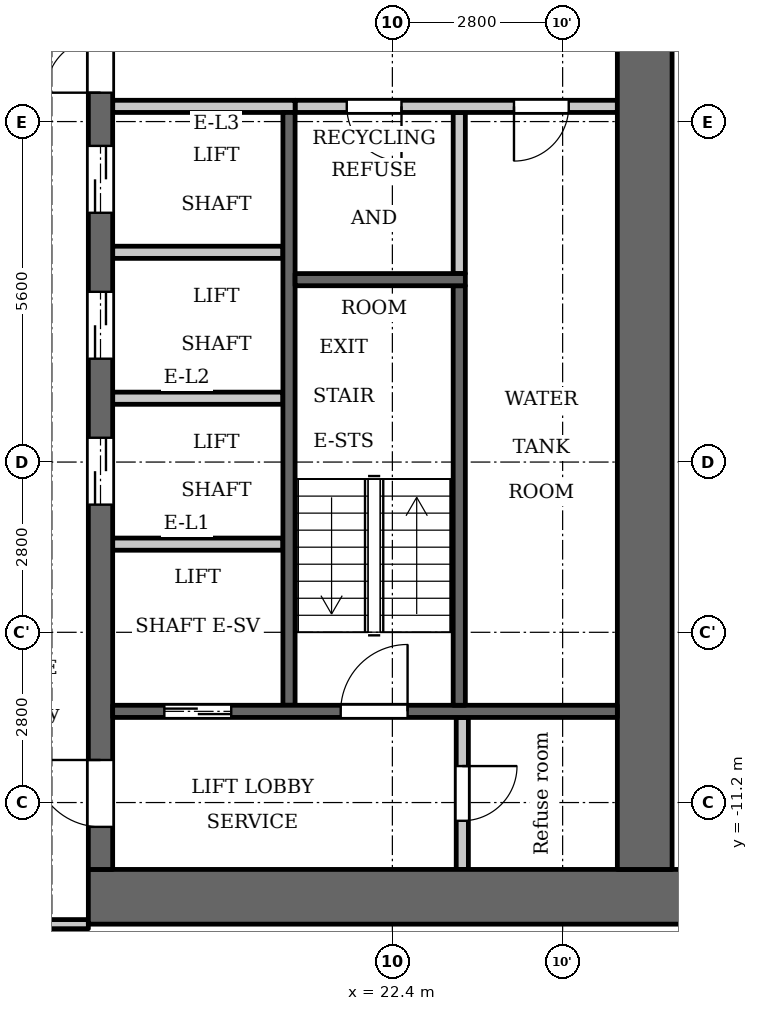
"""IFC4 building model, lengths in metres.
Left out: names, types, materials, properties, quantities, classifications, styles, units other than length and angle.
Written with IfcOpenShell. Run it as: python <this file> out.ifc"""

import sys

from ifc_helpers import new_model, si_unit, direction, frame, frame_2d, origin, place, context, subcontext, project, spatial, rectangle, extrude, element, fill, save


model = new_model("IFC4")
c1 = context("Model", 3, precision=1e-05, world=origin(), true_north=direction((0.0, 1.0)))
c2 = subcontext(c1, "Body", "Model", "MODEL_VIEW")
j1 = project(units=[si_unit("LENGTHUNIT", "METRE"), si_unit("PLANEANGLEUNIT", "RADIAN")], contexts=[c1])
p1 = place(None, origin())
s1 = spatial("IfcSite", under=j1, at=p1, CompositionType="ELEMENT")
p2 = place(p1, origin())
s2 = spatial("IfcBuilding", under=s1, at=p2, CompositionType="ELEMENT")
p3 = place(p2, frame((0.0, 0.0, 65.5)))
s3 = spatial("IfcBuildingStorey", under=s2, at=p3, CompositionType="ELEMENT", Elevation=65.5)
p4 = place(p3, frame((23.5, -2.5, 0.0), z_axis=(0.0, 0.0, 1.0), x_axis=(0.0, 1.0, 0.0)))
e1 = element("IfcWall", 1, at=p4, inside=s3, PredefinedType="PARTITIONING", context=c2, shape_type="SweptSolid", body=[
    extrude(rectangle(XDim=2.65, YDim=0.2, at=frame_2d((1.325, 0.0))), origin(), (0.0, 0.0, 1.0), 3.2),
])
p5 = place(p3, frame((20.7, -9.6, 0.0), z_axis=(0.0, 0.0, 1.0), x_axis=(0.0, 1.0, 0.0)))
e2 = element("IfcWall", 2, at=p5, inside=s3, PredefinedType="SHEAR", context=c2, shape_type="SweptSolid", body=[
    extrude(rectangle(XDim=9.75, YDim=0.2, at=frame_2d((4.875, 0.0))), origin(), (0.0, 0.0, 1.0), 3.2),
])
p6 = place(p3, frame((20.8, 0.25, 0.0), z_axis=(0.0, 0.0, 1.0), x_axis=(1.0, 0.0, 0.0)))
e3 = element("IfcWall", 3, at=p6, inside=s3, PredefinedType="PARTITIONING", context=c2, shape_type="SweptSolid", body=[
    extrude(rectangle(XDim=5.3, YDim=0.2, at=frame_2d((2.65, 0.0))), origin(), (0.0, 0.0, 1.0), 3.2),
])
p7 = place(p6, frame((0.85, 0.0, 0.0)))
e4 = element("IfcOpeningElement", 4, at=p7, cuts=e3, PredefinedType="OPENING", context=c2, shape_type="SweptSolid", body=[
    extrude(rectangle(XDim=0.9, YDim=2.1, at=frame_2d((0.45, 1.05))), frame((0.0, 0.11, 0.0), z_axis=(0.0, -1.0, 0.0), x_axis=(1.0, 0.0, 0.0)), (0.0, 0.0, 1.0), 0.22),
])
p8 = place(p6, frame((3.6, 0.0, 0.0)))
e5 = element("IfcOpeningElement", 5, at=p8, cuts=e3, PredefinedType="OPENING", context=c2, shape_type="SweptSolid", body=[
    extrude(rectangle(XDim=0.9, YDim=2.1, at=frame_2d((0.45, 1.05))), frame((0.0, 0.11, 0.0), z_axis=(0.0, -1.0, 0.0), x_axis=(1.0, 0.0, 0.0)), (0.0, 0.0, 1.0), 0.22),
])
p9 = place(p3, frame((17.4, -12.75, 0.0), z_axis=(0.0, 0.0, 1.0), x_axis=(1.0, 0.0, 0.0)))
e6 = element("IfcWall", 6, at=p9, inside=s3, PredefinedType="SHEAR", context=c2, shape_type="SweptSolid", body=[
    extrude(rectangle(XDim=10.4, YDim=0.9, at=frame_2d((5.2, 0.0))), origin(), (0.0, 0.0, 1.0), 3.2),
])
p10 = place(p3, frame((17.6, -12.3, 0.0), z_axis=(0.0, 0.0, 1.0), x_axis=(0.0, 1.0, 0.0)))
e7 = element("IfcWall", 7, at=p10, inside=s3, PredefinedType="SHEAR", context=c2, shape_type="SweptSolid", body=[
    extrude(rectangle(XDim=24.6, YDim=0.4, at=frame_2d((12.3, 0.0))), origin(), (0.0, 0.0, 1.0), 3.2),
])
p11 = place(p10, frame((6.0, 0.0, 0.0)))
e8 = element("IfcOpeningElement", 8, at=p11, cuts=e7, PredefinedType="OPENING", context=c2, shape_type="SweptSolid", body=[
    extrude(rectangle(XDim=1.1, YDim=2.1, at=frame_2d((0.55, 1.05))), frame((0.0, 0.21, 0.0), z_axis=(0.0, -1.0, 0.0), x_axis=(1.0, 0.0, 0.0)), (0.0, 0.0, 1.0), 0.42),
])
p12 = place(p10, frame((8.4, 0.0, 0.0)))
e9 = element("IfcOpeningElement", 9, at=p12, cuts=e7, PredefinedType="OPENING", context=c2, shape_type="SweptSolid", body=[
    extrude(rectangle(XDim=1.1, YDim=2.1, at=frame_2d((0.55, 1.05))), frame((0.0, 0.21, 0.0), z_axis=(0.0, -1.0, 0.0), x_axis=(1.0, 0.0, 0.0)), (0.0, 0.0, 1.0), 0.42),
])
p13 = place(p10, frame((10.8, 0.0, 0.0)))
e10 = element("IfcOpeningElement", 10, at=p13, cuts=e7, PredefinedType="OPENING", context=c2, shape_type="SweptSolid", body=[
    extrude(rectangle(XDim=1.1, YDim=2.1, at=frame_2d((0.55, 1.05))), frame((0.0, 0.21, 0.0), z_axis=(0.0, -1.0, 0.0), x_axis=(1.0, 0.0, 0.0)), (0.0, 0.0, 1.0), 0.42),
])
p14 = place(p10, frame((16.75, 0.0, 0.0)))
e11 = element("IfcOpeningElement", 11, at=p14, cuts=e7, PredefinedType="OPENING", context=c2, shape_type="SweptSolid", body=[
    extrude(rectangle(XDim=0.9, YDim=2.1, at=frame_2d((0.45, 1.05))), frame((0.0, 0.21, 0.0), z_axis=(0.0, -1.0, 0.0), x_axis=(1.0, 0.0, 0.0)), (0.0, 0.0, 1.0), 0.42),
])
p15 = place(p10, frame((22.8, 0.0, 0.0)))
e12 = element("IfcOpeningElement", 12, at=p15, cuts=e7, PredefinedType="OPENING", context=c2, shape_type="SweptSolid", body=[
    extrude(rectangle(XDim=1.1, YDim=2.1, at=frame_2d((0.55, 1.05))), frame((0.0, 0.21, 0.0), z_axis=(0.0, -1.0, 0.0), x_axis=(1.0, 0.0, 0.0)), (0.0, 0.0, 1.0), 0.42),
])
p16 = place(p10, frame((0.7, 0.0, 0.0)))
e13 = element("IfcOpeningElement", 13, at=p16, cuts=e7, PredefinedType="OPENING", context=c2, shape_type="SweptSolid", body=[
    extrude(rectangle(XDim=1.1, YDim=2.1, at=frame_2d((0.55, 1.05))), frame((0.0, 0.21, 0.0), z_axis=(0.0, -1.0, 0.0), x_axis=(1.0, 0.0, 0.0)), (0.0, 0.0, 1.0), 0.42),
])
p17 = place(p10, frame((12.775, 0.0, 0.0)))
e14 = element("IfcOpeningElement", 14, at=p17, cuts=e7, PredefinedType="OPENING", context=c2, shape_type="SweptSolid", body=[
    extrude(rectangle(XDim=1.8, YDim=2.1, at=frame_2d((0.9, 1.05))), frame((0.0, 0.21, 0.0), z_axis=(0.0, -1.0, 0.0), x_axis=(1.0, 0.0, 0.0)), (0.0, 0.0, 1.0), 0.42),
])
p18 = place(p3, frame((26.55, -12.3, 0.0), z_axis=(0.0, 0.0, 1.0), x_axis=(0.0, 1.0, 0.0)))
e15 = element("IfcWall", 15, at=p18, inside=s3, PredefinedType="SHEAR", context=c2, shape_type="SweptSolid", body=[
    extrude(rectangle(XDim=24.6, YDim=0.9, at=frame_2d((12.3, 0.0))), origin(), (0.0, 0.0, 1.0), 3.2),
])
p19 = place(p3, frame((23.55, -12.3, 0.0), z_axis=(0.0, 0.0, 1.0), x_axis=(0.0, 1.0, 0.0)))
e16 = element("IfcWall", 16, at=p19, inside=s3, PredefinedType="PARTITIONING", context=c2, shape_type="SweptSolid", body=[
    extrude(rectangle(XDim=2.5, YDim=0.2, at=frame_2d((1.25, 0.0))), origin(), (0.0, 0.0, 1.0), 3.2),
])
p20 = place(p19, frame((0.8, 0.0, 0.0)))
e17 = element("IfcOpeningElement", 17, at=p20, cuts=e16, PredefinedType="OPENING", context=c2, shape_type="SweptSolid", body=[
    extrude(rectangle(XDim=0.9, YDim=2.1, at=frame_2d((0.45, 1.05))), frame((0.0, 0.11, 0.0), z_axis=(0.0, -1.0, 0.0), x_axis=(1.0, 0.0, 0.0)), (0.0, 0.0, 1.0), 0.22),
])
p21 = place(p3, frame((17.8, -9.7, 0.0), z_axis=(0.0, 0.0, 1.0), x_axis=(1.0, 0.0, 0.0)))
e18 = element("IfcWall", 18, at=p21, inside=s3, PredefinedType="SHEAR", context=c2, shape_type="SweptSolid", body=[
    extrude(rectangle(XDim=8.3, YDim=0.2, at=frame_2d((4.15, 0.0))), origin(), (0.0, 0.0, 1.0), 3.2),
])
p22 = place(p21, frame((0.85, 0.0, 0.0)))
e19 = element("IfcOpeningElement", 19, at=p22, cuts=e18, PredefinedType="OPENING", context=c2, shape_type="SweptSolid", body=[
    extrude(rectangle(XDim=1.1, YDim=2.1, at=frame_2d((0.55, 1.05))), frame((0.0, 0.11, 0.0), z_axis=(0.0, -1.0, 0.0), x_axis=(1.0, 0.0, 0.0)), (0.0, 0.0, 1.0), 0.22),
])
p23 = place(p21, frame((3.75, 0.0, 0.0)))
e20 = element("IfcOpeningElement", 20, at=p23, cuts=e18, PredefinedType="OPENING", context=c2, shape_type="SweptSolid", body=[
    extrude(rectangle(XDim=1.1, YDim=2.1, at=frame_2d((0.55, 1.05))), frame((0.0, 0.11, 0.0), z_axis=(0.0, -1.0, 0.0), x_axis=(1.0, 0.0, 0.0)), (0.0, 0.0, 1.0), 0.22),
])
for number, where, z_axis, x_axis in (
    (21, (17.8, -6.95, 0.0), (0.0, 0.0, 1.0), (1.0, 0.0, 0.0)),
    (22, (17.8, -4.55, 0.0), (0.0, 0.0, 1.0), (1.0, 0.0, 0.0)),
    (23, (17.8, -2.15, 0.0), (0.0, 0.0, 1.0), (1.0, 0.0, 0.0)),
):
    element("IfcWall", number, at=place(p3, frame(where, z_axis=z_axis, x_axis=x_axis)), inside=s3, PredefinedType="PARTITIONING", context=c2, shape_type="SweptSolid", body=[
        extrude(rectangle(XDim=2.8, YDim=0.2, at=frame_2d((1.4, 0.0))), origin(), (0.0, 0.0, 1.0), 3.2),
    ])
p24 = place(p3, frame((17.8, 0.25, 0.0), z_axis=(0.0, 0.0, 1.0), x_axis=(1.0, 0.0, 0.0)))
e24 = element("IfcWall", 24, at=p24, inside=s3, PredefinedType="PARTITIONING", context=c2, shape_type="SweptSolid", body=[
    extrude(rectangle(XDim=3.0, YDim=0.2, at=frame_2d((1.5, 0.0))), origin(), (0.0, 0.0, 1.0), 3.2),
])
p25 = place(p3, frame((23.5, -9.6, 0.0), z_axis=(0.0, 0.0, 1.0), x_axis=(0.0, 1.0, 0.0)))
e25 = element("IfcWall", 25, at=p25, inside=s3, PredefinedType="SHEAR", context=c2, shape_type="SweptSolid", body=[
    extrude(rectangle(XDim=6.9, YDim=0.2, at=frame_2d((3.45, 0.0))), origin(), (0.0, 0.0, 1.0), 3.2),
])
p26 = place(p3, frame((20.8, -2.6, 0.0), z_axis=(0.0, 0.0, 1.0), x_axis=(1.0, 0.0, 0.0)))
e26 = element("IfcWall", 26, at=p26, inside=s3, PredefinedType="SHEAR", context=c2, shape_type="SweptSolid", body=[
    extrude(rectangle(XDim=2.8, YDim=0.2, at=frame_2d((1.4, 0.0))), origin(), (0.0, 0.0, 1.0), 3.2),
])
p27 = place(p3, frame((-17.4, -13.2, 0.0), z_axis=(0.0, 0.0, 1.0), x_axis=(1.0, 0.0, 0.0)))
e27 = element("IfcWall", 27, at=p27, inside=s3, PredefinedType="PARTITIONING", context=c2, shape_type="SweptSolid", body=[
    extrude(rectangle(XDim=34.8, YDim=0.15, at=frame_2d((17.4, 0.0))), origin(), (0.0, 0.0, 1.0), 3.2),
])
p28 = place(p27, frame((0.65, 0.0, 0.0)))
e28 = element("IfcOpeningElement", 28, at=p28, cuts=e27, PredefinedType="OPENING", context=c2, shape_type="SweptSolid", body=[
    extrude(rectangle(XDim=1.0, YDim=2.1, at=frame_2d((0.5, 1.05))), frame((0.0, 0.085, 0.0), z_axis=(0.0, -1.0, 0.0), x_axis=(1.0, 0.0, 0.0)), (0.0, 0.0, 1.0), 0.17),
])
p29 = place(p27, frame((33.05, 0.0, 0.0)))
e29 = element("IfcOpeningElement", 29, at=p29, cuts=e27, PredefinedType="OPENING", context=c2, shape_type="SweptSolid", body=[
    extrude(rectangle(XDim=1.0, YDim=2.1, at=frame_2d((0.5, 1.05))), frame((0.0, 0.085, 0.0), z_axis=(0.0, -1.0, 0.0), x_axis=(1.0, 0.0, 0.0)), (0.0, 0.0, 1.0), 0.17),
])
p30 = place(p27, frame((4.55, 0.0, 0.0)))
e30 = element("IfcOpeningElement", 30, at=p30, cuts=e27, PredefinedType="OPENING", context=c2, shape_type="SweptSolid", body=[
    extrude(rectangle(XDim=1.0, YDim=2.1, at=frame_2d((0.5, 1.05))), frame((0.0, 0.085, 0.0), z_axis=(0.0, -1.0, 0.0), x_axis=(1.0, 0.0, 0.0)), (0.0, 0.0, 1.0), 0.17),
])
p31 = place(p27, frame((15.75, 0.0, 0.0)))
e31 = element("IfcOpeningElement", 31, at=p31, cuts=e27, PredefinedType="OPENING", context=c2, shape_type="SweptSolid", body=[
    extrude(rectangle(XDim=1.0, YDim=2.1, at=frame_2d((0.5, 1.05))), frame((0.0, 0.085, 0.0), z_axis=(0.0, -1.0, 0.0), x_axis=(1.0, 0.0, 0.0)), (0.0, 0.0, 1.0), 0.17),
])
p32 = place(p27, frame((18.1, 0.0, 0.0)))
e32 = element("IfcOpeningElement", 32, at=p32, cuts=e27, PredefinedType="OPENING", context=c2, shape_type="SweptSolid", body=[
    extrude(rectangle(XDim=1.0, YDim=2.1, at=frame_2d((0.5, 1.05))), frame((0.0, 0.085, 0.0), z_axis=(0.0, -1.0, 0.0), x_axis=(1.0, 0.0, 0.0)), (0.0, 0.0, 1.0), 0.17),
])
p33 = place(p27, frame((26.95, 0.0, 0.0)))
e33 = element("IfcOpeningElement", 33, at=p33, cuts=e27, PredefinedType="OPENING", context=c2, shape_type="SweptSolid", body=[
    extrude(rectangle(XDim=1.0, YDim=2.1, at=frame_2d((0.5, 1.05))), frame((0.0, 0.085, 0.0), z_axis=(0.0, -1.0, 0.0), x_axis=(1.0, 0.0, 0.0)), (0.0, 0.0, 1.0), 0.17),
])
p34 = place(p22, origin())
e34 = element("IfcDoor", 34, at=p34, inside=s3, OperationType="DOUBLE_DOOR_SLIDING", PredefinedType="DOOR", context=c2, shape_type="SweptSolid", body=[
    extrude(rectangle(XDim=1.1, YDim=2.1, at=frame_2d((0.55, 1.05))), frame((0.0, 0.025, 0.0), z_axis=(0.0, -1.0, 0.0), x_axis=(1.0, 0.0, 0.0)), (0.0, 0.0, 1.0), 0.05),
])
fill(e19, e34)
p35 = place(p11, origin())
e35 = element("IfcDoor", 35, at=p35, inside=s3, OperationType="DOUBLE_DOOR_SLIDING", PredefinedType="DOOR", context=c2, shape_type="SweptSolid", body=[
    extrude(rectangle(XDim=1.1, YDim=2.1, at=frame_2d((0.55, 1.05))), frame((0.0, 0.025, 0.0), z_axis=(0.0, -1.0, 0.0), x_axis=(1.0, 0.0, 0.0)), (0.0, 0.0, 1.0), 0.05),
])
fill(e8, e35)
p36 = place(p12, origin())
e36 = element("IfcDoor", 36, at=p36, inside=s3, OperationType="DOUBLE_DOOR_SLIDING", PredefinedType="DOOR", context=c2, shape_type="SweptSolid", body=[
    extrude(rectangle(XDim=1.1, YDim=2.1, at=frame_2d((0.55, 1.05))), frame((0.0, 0.025, 0.0), z_axis=(0.0, -1.0, 0.0), x_axis=(1.0, 0.0, 0.0)), (0.0, 0.0, 1.0), 0.05),
])
fill(e9, e36)
p37 = place(p13, origin())
e37 = element("IfcDoor", 37, at=p37, inside=s3, OperationType="DOUBLE_DOOR_SLIDING", PredefinedType="DOOR", context=c2, shape_type="SweptSolid", body=[
    extrude(rectangle(XDim=1.1, YDim=2.1, at=frame_2d((0.55, 1.05))), frame((0.0, 0.025, 0.0), z_axis=(0.0, -1.0, 0.0), x_axis=(1.0, 0.0, 0.0)), (0.0, 0.0, 1.0), 0.05),
])
fill(e10, e37)
p38 = place(p16, origin())
e38 = element("IfcDoor", 38, at=p38, inside=s3, OperationType="SINGLE_SWING_LEFT", PredefinedType="DOOR", context=c2, shape_type="SweptSolid", body=[
    extrude(rectangle(XDim=1.1, YDim=2.1, at=frame_2d((0.55, 1.05))), frame((0.0, 0.025, 0.0), z_axis=(0.0, -1.0, 0.0), x_axis=(1.0, 0.0, 0.0)), (0.0, 0.0, 1.0), 0.05),
])
fill(e13, e38)
p39 = place(p20, origin())
e39 = element("IfcDoor", 39, at=p39, inside=s3, OperationType="SINGLE_SWING_RIGHT", PredefinedType="DOOR", context=c2, shape_type="SweptSolid", body=[
    extrude(rectangle(XDim=0.9, YDim=2.1, at=frame_2d((0.45, 1.05))), frame((0.0, 0.025, 0.0), z_axis=(0.0, -1.0, 0.0), x_axis=(1.0, 0.0, 0.0)), (0.0, 0.0, 1.0), 0.05),
])
fill(e17, e39)
p40 = place(p23, origin())
e40 = element("IfcDoor", 40, at=p40, inside=s3, OperationType="SINGLE_SWING_LEFT", PredefinedType="DOOR", context=c2, shape_type="SweptSolid", body=[
    extrude(rectangle(XDim=1.1, YDim=2.1, at=frame_2d((0.55, 1.05))), frame((0.0, 0.025, 0.0), z_axis=(0.0, -1.0, 0.0), x_axis=(1.0, 0.0, 0.0)), (0.0, 0.0, 1.0), 0.05),
])
fill(e20, e40)
p41 = place(p17, origin())
e41 = element("IfcDoor", 41, at=p41, inside=s3, OperationType="DOUBLE_DOOR_SINGLE_SWING", PredefinedType="DOOR", context=c2, shape_type="SweptSolid", body=[
    extrude(rectangle(XDim=1.8, YDim=2.1, at=frame_2d((0.9, 1.05))), frame((0.0, 0.025, 0.0), z_axis=(0.0, -1.0, 0.0), x_axis=(1.0, 0.0, 0.0)), (0.0, 0.0, 1.0), 0.05),
])
fill(e14, e41)
p42 = place(p7, origin())
e42 = element("IfcDoor", 42, at=p42, inside=s3, OperationType="SINGLE_SWING_RIGHT", PredefinedType="DOOR", context=c2, shape_type="SweptSolid", body=[
    extrude(rectangle(XDim=0.9, YDim=2.1, at=frame_2d((0.45, 1.05))), frame((0.0, 0.025, 0.0), z_axis=(0.0, -1.0, 0.0), x_axis=(1.0, 0.0, 0.0)), (0.0, 0.0, 1.0), 0.05),
])
fill(e4, e42)
p43 = place(p8, origin())
e43 = element("IfcDoor", 43, at=p43, inside=s3, OperationType="SINGLE_SWING_LEFT", PredefinedType="DOOR", context=c2, shape_type="SweptSolid", body=[
    extrude(rectangle(XDim=0.9, YDim=2.1, at=frame_2d((0.45, 1.05))), frame((0.0, 0.025, 0.0), z_axis=(0.0, -1.0, 0.0), x_axis=(1.0, 0.0, 0.0)), (0.0, 0.0, 1.0), 0.05),
])
fill(e5, e43)
save(model, sys.argv[1])
